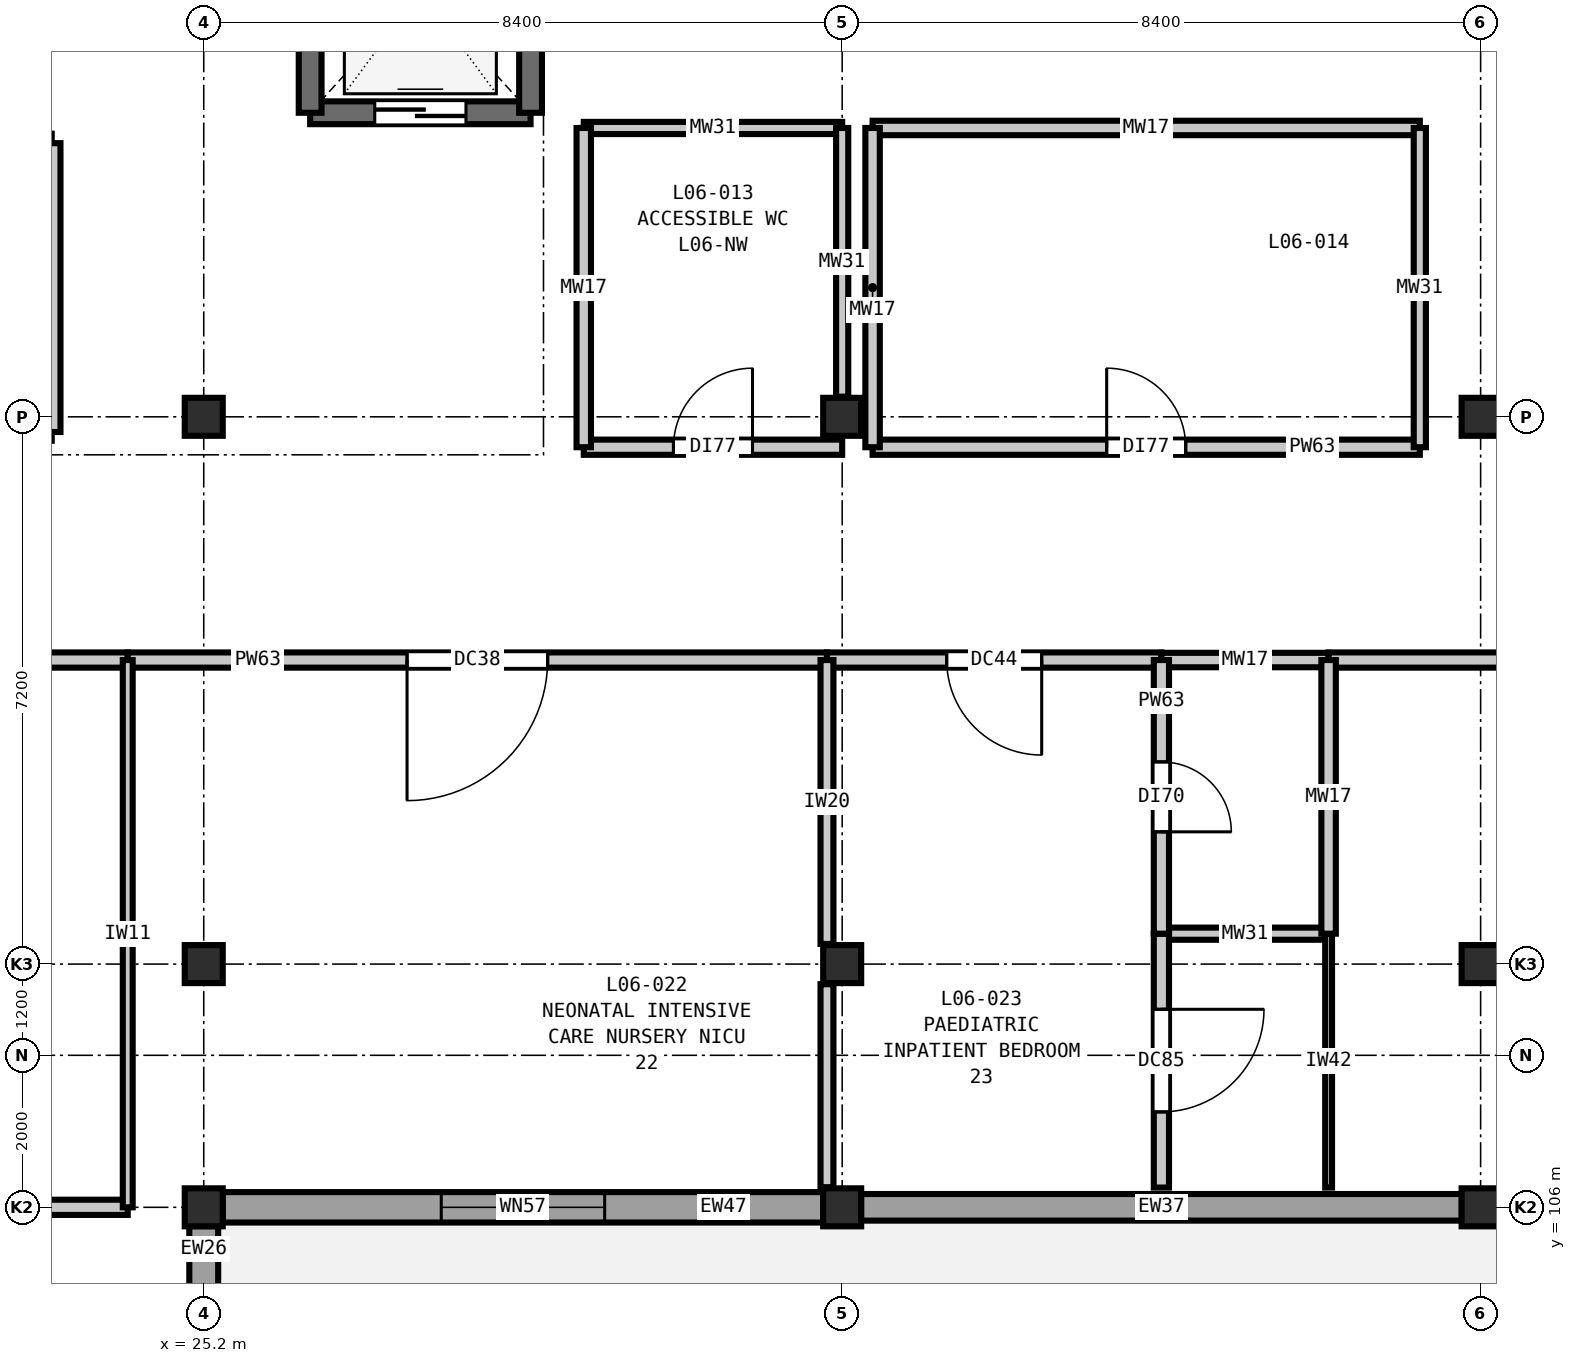
"""IFC4 building model, lengths in metres.
Left out: names, types, materials, properties, quantities, classifications, styles, units other than length and angle.
Written with IfcOpenShell. Run it as: python <this file> out.ifc"""

import sys

from ifc_helpers import new_model, si_unit, direction, frame, frame_2d, origin, origin_2d, place, context, subcontext, project, spatial, rectangle, extrude, element, fill, save


model = new_model("IFC4")
c1 = context("Model", 3, precision=1e-05, world=origin(), true_north=direction((0.0, 1.0)))
c2 = subcontext(c1, "Body", "Model", "MODEL_VIEW")
j1 = project(units=[si_unit("LENGTHUNIT", "METRE"), si_unit("PLANEANGLEUNIT", "RADIAN")], contexts=[c1])
p1 = place(None, origin())
s1 = spatial("IfcSite", under=j1, at=p1, CompositionType="ELEMENT")
p2 = place(p1, origin())
s2 = spatial("IfcBuilding", under=s1, at=p2, CompositionType="ELEMENT")
p3 = place(p2, frame((0.0, 0.0, 28.8)))
s3 = spatial("IfcBuildingStorey", under=s2, at=p3, CompositionType="ELEMENT", Elevation=28.8)
for number, where, z_axis, x_axis in (
    (1, (25.2, 106.0, 0.0), (0.0, 0.0, 1.0), (1.0, 0.0, 0.0)),
    (2, (25.2, 109.2, 0.0), (0.0, 0.0, 1.0), (1.0, 0.0, 0.0)),
    (3, (25.2, 116.4, 0.0), (0.0, 0.0, 1.0), (1.0, 0.0, 0.0)),
    (4, (33.6, 106.0, 0.0), (0.0, 0.0, 1.0), (1.0, 0.0, 0.0)),
    (5, (33.6, 109.2, 0.0), (0.0, 0.0, 1.0), (1.0, 0.0, 0.0)),
    (6, (33.6, 116.4, 0.0), (0.0, 0.0, 1.0), (1.0, 0.0, 0.0)),
    (7, (42.0, 106.0, 0.0), (0.0, 0.0, 1.0), (1.0, 0.0, 0.0)),
    (8, (42.0, 109.2, 0.0), (0.0, 0.0, 1.0), (1.0, 0.0, 0.0)),
    (9, (42.0, 116.4, 0.0), (0.0, 0.0, 1.0), (1.0, 0.0, 0.0)),
):
    element("IfcColumn", number, at=place(p3, frame(where, z_axis=z_axis, x_axis=x_axis)), inside=s3, PredefinedType="COLUMN", context=c2, shape_type="SweptSolid", body=[
        extrude(rectangle(XDim=0.5, YDim=0.5, at=origin_2d()), origin(), (0.0, 0.0, 1.0), 4.2),
    ])
p4 = place(p3, frame((41.752, 106.0, 0.0), z_axis=(0.0, 0.0, 1.0), x_axis=(-1.0, 0.0, 0.0)))
e10 = element("IfcWall", 10, at=p4, inside=s3, PredefinedType="SOLIDWALL", context=c2, shape_type="SweptSolid", body=[
    extrude(rectangle(XDim=7.904, YDim=0.35, at=frame_2d((3.952, 0.0))), origin(), (0.0, 0.0, 1.0), 3.48),
])
p5 = place(p3, frame((33.352, 106.0, 0.0), z_axis=(0.0, 0.0, 1.0), x_axis=(-1.0, 0.0, 0.0)))
e11 = element("IfcWall", 11, at=p5, inside=s3, PredefinedType="SOLIDWALL", context=c2, shape_type="SweptSolid", body=[
    extrude(rectangle(XDim=7.904, YDim=0.4, at=frame_2d((3.952, 0.0))), origin(), (0.0, 0.0, 1.0), 3.48),
])
p6 = place(p5, frame((2.877, 0.0, 0.9)))
e12 = element("IfcOpeningElement", 12, at=p6, cuts=e11, PredefinedType="OPENING", context=c2, shape_type="SweptSolid", body=[
    extrude(rectangle(XDim=2.15, YDim=2.15, at=frame_2d((1.075, 1.075))), frame((0.0, 0.21, 0.0), z_axis=(0.0, -1.0, 0.0), x_axis=(1.0, 0.0, 0.0)), (0.0, 0.0, 1.0), 0.42),
])
p7 = place(p3, frame((25.2, 105.752, 0.0), z_axis=(0.0, 0.0, 1.0), x_axis=(0.0, -1.0, 0.0)))
e13 = element("IfcWall", 13, at=p7, inside=s3, PredefinedType="SOLIDWALL", context=c2, shape_type="SweptSolid", body=[
    extrude(rectangle(XDim=2.704, YDim=0.38, at=frame_2d((1.352, 0.0))), origin(), (0.0, 0.0, 1.0), 3.48),
])
p8 = place(p7, frame((0.852, 0.0, 0.9)))
e14 = element("IfcOpeningElement", 14, at=p8, cuts=e13, PredefinedType="OPENING", context=c2, shape_type="SweptSolid", body=[
    extrude(rectangle(XDim=1.0, YDim=1.55, at=frame_2d((0.5, 0.775))), frame((0.0, 0.2, 0.0), z_axis=(0.0, -1.0, 0.0), x_axis=(1.0, 0.0, 0.0)), (0.0, 0.0, 1.0), 0.4),
])
p9 = place(p3, frame((26.6, 120.4, 0.0), z_axis=(0.0, 0.0, 1.0), x_axis=(1.0, 0.0, 0.0)))
e15 = element("IfcWall", 15, at=p9, inside=s3, PredefinedType="SHEAR", context=c2, shape_type="SweptSolid", body=[
    extrude(rectangle(XDim=2.9, YDim=0.3, at=frame_2d((1.45, 0.0))), origin(), (0.0, 0.0, 1.0), 4.2),
])
p10 = place(p9, frame((0.85, 0.0, 0.0)))
e16 = element("IfcOpeningElement", 16, at=p10, cuts=e15, PredefinedType="OPENING", context=c2, shape_type="SweptSolid", body=[
    extrude(rectangle(XDim=1.2, YDim=2.2, at=frame_2d((0.6, 1.1))), frame((0.0, 0.16, 0.0), z_axis=(0.0, -1.0, 0.0), x_axis=(1.0, 0.0, 0.0)), (0.0, 0.0, 1.0), 0.32),
])
for number, where, z_axis, x_axis in (
    (17, (29.5, 120.4, 0.0), (0.0, 0.0, 1.0), (0.0, 1.0, 0.0)),
    (18, (26.6, 123.6, 0.0), (0.0, 0.0, 1.0), (0.0, -1.0, 0.0)),
):
    element("IfcWall", number, at=place(p3, frame(where, z_axis=z_axis, x_axis=x_axis)), inside=s3, PredefinedType="SHEAR", context=c2, shape_type="SweptSolid", body=[
        extrude(rectangle(XDim=3.2, YDim=0.3, at=frame_2d((1.6, 0.0))), origin(), (0.0, 0.0, 1.0), 4.2),
    ])
p11 = place(p3, frame((17.065, 106.0, 0.0), z_axis=(0.0, 0.0, 1.0), x_axis=(1.0, 0.0, 0.0)))
e19 = element("IfcWall", 19, at=p11, inside=s3, PredefinedType="PARTITIONING", context=c2, shape_type="SweptSolid", body=[
    extrude(rectangle(XDim=7.135, YDim=0.2, at=frame_2d((3.567, 0.0))), origin(), (0.0, 0.0, 1.0), 3.635),
])
p12 = place(p11, frame((2.643, 0.0, 0.0)))
e20 = element("IfcOpeningElement", 20, at=p12, cuts=e19, PredefinedType="OPENING", context=c2, shape_type="SweptSolid", body=[
    extrude(rectangle(XDim=1.85, YDim=2.3, at=frame_2d((0.925, 1.15))), frame((0.0, 0.11, 0.0), z_axis=(0.0, -1.0, 0.0), x_axis=(1.0, 0.0, 0.0)), (0.0, 0.0, 1.0), 0.22),
])
p13 = place(p3, frame((37.8, 109.6, 0.0), z_axis=(0.0, 0.0, 1.0), x_axis=(1.0, 0.0, 0.0)))
e21 = element("IfcWall", 21, at=p13, inside=s3, PredefinedType="PLUMBINGWALL", context=c2, shape_type="SweptSolid", body=[
    extrude(rectangle(XDim=2.2, YDim=0.16, at=frame_2d((1.1, 0.0))), origin(), (0.0, 0.0, 1.0), 3.92),
])
p14 = place(p3, frame((15.8, 113.2, 0.0), z_axis=(0.0, 0.0, 1.0), x_axis=(1.0, 0.0, 0.0)))
e22 = element("IfcWall", 22, at=p14, inside=s3, PredefinedType="PARTITIONING", context=c2, shape_type="SweptSolid", body=[
    extrude(rectangle(XDim=8.4, YDim=0.2, at=frame_2d((4.2, 0.0))), origin(), (0.0, 0.0, 1.0), 3.92),
])
p15 = place(p14, frame((3.35, 0.0, 0.0)))
e23 = element("IfcOpeningElement", 23, at=p15, cuts=e22, PredefinedType="OPENING", context=c2, shape_type="SweptSolid", body=[
    extrude(rectangle(XDim=1.7, YDim=2.3, at=frame_2d((0.85, 1.15))), frame((0.0, 0.11, 0.0), z_axis=(0.0, -1.0, 0.0), x_axis=(1.0, 0.0, 0.0)), (0.0, 0.0, 1.0), 0.22),
])
p16 = place(p3, frame((24.2, 113.2, 0.0), z_axis=(0.0, 0.0, 1.0), x_axis=(1.0, 0.0, 0.0)))
e24 = element("IfcWall", 24, at=p16, inside=s3, PredefinedType="PARTITIONING", context=c2, shape_type="SweptSolid", body=[
    extrude(rectangle(XDim=9.2, YDim=0.2, at=frame_2d((4.6, 0.0))), origin(), (0.0, 0.0, 1.0), 3.92),
])
p17 = place(p16, frame((3.675, 0.0, 0.0)))
e25 = element("IfcOpeningElement", 25, at=p17, cuts=e24, PredefinedType="OPENING", context=c2, shape_type="SweptSolid", body=[
    extrude(rectangle(XDim=1.85, YDim=2.3, at=frame_2d((0.925, 1.15))), frame((0.0, 0.11, 0.0), z_axis=(0.0, -1.0, 0.0), x_axis=(1.0, 0.0, 0.0)), (0.0, 0.0, 1.0), 0.22),
])
p18 = place(p3, frame((33.4, 113.2, 0.0), z_axis=(0.0, 0.0, 1.0), x_axis=(1.0, 0.0, 0.0)))
e26 = element("IfcWall", 26, at=p18, inside=s3, PredefinedType="PARTITIONING", context=c2, shape_type="SweptSolid", body=[
    extrude(rectangle(XDim=4.4, YDim=0.2, at=frame_2d((2.2, 0.0))), origin(), (0.0, 0.0, 1.0), 3.92),
])
p19 = place(p18, frame((1.575, 0.0, 0.0)))
e27 = element("IfcOpeningElement", 27, at=p19, cuts=e26, PredefinedType="OPENING", context=c2, shape_type="SweptSolid", body=[
    extrude(rectangle(XDim=1.25, YDim=2.15, at=frame_2d((0.625, 1.075))), frame((0.0, 0.11, 0.0), z_axis=(0.0, -1.0, 0.0), x_axis=(1.0, 0.0, 0.0)), (0.0, 0.0, 1.0), 0.22),
])
p20 = place(p3, frame((37.8, 113.2, 0.0), z_axis=(0.0, 0.0, 1.0), x_axis=(1.0, 0.0, 0.0)))
e28 = element("IfcWall", 28, at=p20, inside=s3, PredefinedType="PLUMBINGWALL", context=c2, shape_type="SweptSolid", body=[
    extrude(rectangle(XDim=2.2, YDim=0.19, at=frame_2d((1.1, 0.0))), origin(), (0.0, 0.0, 1.0), 3.92),
])
p21 = place(p3, frame((40.0, 113.2, 0.0), z_axis=(0.0, 0.0, 1.0), x_axis=(1.0, 0.0, 0.0)))
e29 = element("IfcWall", 29, at=p21, inside=s3, PredefinedType="PARTITIONING", context=c2, shape_type="SweptSolid", body=[
    extrude(rectangle(XDim=8.4, YDim=0.2, at=frame_2d((4.2, 0.0))), origin(), (0.0, 0.0, 1.0), 3.92),
])
p22 = place(p21, frame((3.55, 0.0, 0.0)))
e30 = element("IfcOpeningElement", 30, at=p22, cuts=e29, PredefinedType="OPENING", context=c2, shape_type="SweptSolid", body=[
    extrude(rectangle(XDim=1.3, YDim=2.2, at=frame_2d((0.65, 1.1))), frame((0.0, 0.11, 0.0), z_axis=(0.0, -1.0, 0.0), x_axis=(1.0, 0.0, 0.0)), (0.0, 0.0, 1.0), 0.22),
])
p23 = place(p3, frame((30.2, 116.0, 0.0), z_axis=(0.0, 0.0, 1.0), x_axis=(1.0, 0.0, 0.0)))
e31 = element("IfcWall", 31, at=p23, inside=s3, PredefinedType="PARTITIONING", context=c2, shape_type="SweptSolid", body=[
    extrude(rectangle(XDim=3.4, YDim=0.2, at=frame_2d((1.7, 0.0))), origin(), (0.0, 0.0, 1.0), 3.92),
])
p24 = place(p23, frame((1.18, 0.0, 0.0)))
e32 = element("IfcOpeningElement", 32, at=p24, cuts=e31, PredefinedType="OPENING", context=c2, shape_type="SweptSolid", body=[
    extrude(rectangle(XDim=1.04, YDim=2.1, at=frame_2d((0.52, 1.05))), frame((0.0, 0.11, 0.0), z_axis=(0.0, -1.0, 0.0), x_axis=(1.0, 0.0, 0.0)), (0.0, 0.0, 1.0), 0.22),
])
p25 = place(p3, frame((34.0, 116.0, 0.0), z_axis=(0.0, 0.0, 1.0), x_axis=(1.0, 0.0, 0.0)))
e33 = element("IfcWall", 33, at=p25, inside=s3, PredefinedType="PARTITIONING", context=c2, shape_type="SweptSolid", body=[
    extrude(rectangle(XDim=7.2, YDim=0.2, at=frame_2d((3.6, 0.0))), origin(), (0.0, 0.0, 1.0), 3.92),
])
p26 = place(p25, frame((3.08, 0.0, 0.0)))
e34 = element("IfcOpeningElement", 34, at=p26, cuts=e33, PredefinedType="OPENING", context=c2, shape_type="SweptSolid", body=[
    extrude(rectangle(XDim=1.04, YDim=2.1, at=frame_2d((0.52, 1.05))), frame((0.0, 0.11, 0.0), z_axis=(0.0, -1.0, 0.0), x_axis=(1.0, 0.0, 0.0)), (0.0, 0.0, 1.0), 0.22),
])
p27 = place(p3, frame((30.2, 120.2, 0.0), z_axis=(0.0, 0.0, 1.0), x_axis=(1.0, 0.0, 0.0)))
e35 = element("IfcWall", 35, at=p27, inside=s3, PredefinedType="PLUMBINGWALL", context=c2, shape_type="SweptSolid", body=[
    extrude(rectangle(XDim=3.4, YDim=0.16, at=frame_2d((1.7, 0.0))), origin(), (0.0, 0.0, 1.0), 3.92),
])
p28 = place(p3, frame((34.0, 120.2, 0.0), z_axis=(0.0, 0.0, 1.0), x_axis=(1.0, 0.0, 0.0)))
e36 = element("IfcWall", 36, at=p28, inside=s3, PredefinedType="PLUMBINGWALL", context=c2, shape_type="SweptSolid", body=[
    extrude(rectangle(XDim=7.2, YDim=0.19, at=frame_2d((3.6, 0.0))), origin(), (0.0, 0.0, 1.0), 3.92),
])
p29 = place(p3, frame((23.2, 116.2, 0.0), z_axis=(0.0, 0.0, 1.0), x_axis=(0.0, 1.0, 0.0)))
e37 = element("IfcWall", 37, at=p29, inside=s3, PredefinedType="PARTITIONING", context=c2, shape_type="SweptSolid", body=[
    extrude(rectangle(XDim=3.8, YDim=0.23, at=frame_2d((1.9, 0.0))), origin(), (0.0, 0.0, 1.0), 3.92),
])
p30 = place(p3, frame((24.2, 106.0, 0.0), z_axis=(0.0, 0.0, 1.0), x_axis=(0.0, 1.0, 0.0)))
e38 = element("IfcWall", 38, at=p30, inside=s3, PredefinedType="PARTITIONING", context=c2, shape_type="SweptSolid", body=[
    extrude(rectangle(XDim=7.2, YDim=0.13, at=frame_2d((3.6, 0.0))), origin(), (0.0, 0.0, 1.0), 3.92),
])
p31 = place(p3, frame((30.2, 116.0, 0.0), z_axis=(0.0, 0.0, 1.0), x_axis=(0.0, 1.0, 0.0)))
e39 = element("IfcWall", 39, at=p31, inside=s3, PredefinedType="PLUMBINGWALL", context=c2, shape_type="SweptSolid", body=[
    extrude(rectangle(XDim=4.2, YDim=0.19, at=frame_2d((2.1, 0.0))), origin(), (0.0, 0.0, 1.0), 3.92),
])
p32 = place(p3, frame((33.4, 109.465, 0.0), z_axis=(0.0, 0.0, 1.0), x_axis=(0.0, 1.0, 0.0)))
e40 = element("IfcWall", 40, at=p32, inside=s3, PredefinedType="PARTITIONING", context=c2, shape_type="SweptSolid", body=[
    extrude(rectangle(XDim=3.735, YDim=0.17, at=frame_2d((1.867, 0.0))), origin(), (0.0, 0.0, 1.0), 3.635),
])
p33 = place(p3, frame((33.4, 106.265, 0.0), z_axis=(0.0, 0.0, 1.0), x_axis=(0.0, 1.0, 0.0)))
e41 = element("IfcWall", 41, at=p33, inside=s3, PredefinedType="PARTITIONING", context=c2, shape_type="SweptSolid", body=[
    extrude(rectangle(XDim=2.67, YDim=0.17, at=frame_2d((1.335, 0.0))), origin(), (0.0, 0.0, 1.0), 3.635),
])
p34 = place(p3, frame((33.6, 116.665, 0.0), z_axis=(0.0, 0.0, 1.0), x_axis=(0.0, 1.0, 0.0)))
e42 = element("IfcWall", 42, at=p34, inside=s3, PredefinedType="PLUMBINGWALL", context=c2, shape_type="SweptSolid", body=[
    extrude(rectangle(XDim=3.535, YDim=0.16, at=frame_2d((1.768, 0.0))), origin(), (0.0, 0.0, 1.0), 3.635),
])
p35 = place(p3, frame((34.0, 116.0, 0.0), z_axis=(0.0, 0.0, 1.0), x_axis=(0.0, 1.0, 0.0)))
e43 = element("IfcWall", 43, at=p35, inside=s3, PredefinedType="PLUMBINGWALL", context=c2, shape_type="SweptSolid", body=[
    extrude(rectangle(XDim=4.2, YDim=0.19, at=frame_2d((2.1, 0.0))), origin(), (0.0, 0.0, 1.0), 3.92),
])
p36 = place(p3, frame((37.8, 106.26, 0.0), z_axis=(0.0, 0.0, 1.0), x_axis=(0.0, 1.0, 0.0)))
e44 = element("IfcWall", 44, at=p36, inside=s3, PredefinedType="PARTITIONING", context=c2, shape_type="SweptSolid", body=[
    extrude(rectangle(XDim=3.34, YDim=0.2, at=frame_2d((1.67, 0.0))), origin(), (0.0, 0.0, 1.0), 3.92),
])
p37 = place(p36, frame((0.995, 0.0, 0.0)))
e45 = element("IfcOpeningElement", 45, at=p37, cuts=e44, PredefinedType="OPENING", context=c2, shape_type="SweptSolid", body=[
    extrude(rectangle(XDim=1.35, YDim=2.2, at=frame_2d((0.675, 1.1))), frame((0.0, 0.11, 0.0), z_axis=(0.0, -1.0, 0.0), x_axis=(1.0, 0.0, 0.0)), (0.0, 0.0, 1.0), 0.22),
])
p38 = place(p3, frame((37.8, 109.6, 0.0), z_axis=(0.0, 0.0, 1.0), x_axis=(0.0, 1.0, 0.0)))
e46 = element("IfcWall", 46, at=p38, inside=s3, PredefinedType="PARTITIONING", context=c2, shape_type="SweptSolid", body=[
    extrude(rectangle(XDim=3.6, YDim=0.2, at=frame_2d((1.8, 0.0))), origin(), (0.0, 0.0, 1.0), 3.92),
])
p39 = place(p38, frame((1.34, 0.0, 0.0)))
e47 = element("IfcOpeningElement", 47, at=p39, cuts=e46, PredefinedType="OPENING", context=c2, shape_type="SweptSolid", body=[
    extrude(rectangle(XDim=0.92, YDim=2.1, at=frame_2d((0.46, 1.05))), frame((0.0, 0.11, 0.0), z_axis=(0.0, -1.0, 0.0), x_axis=(1.0, 0.0, 0.0)), (0.0, 0.0, 1.0), 0.22),
])
p40 = place(p3, frame((40.0, 106.26, 0.0), z_axis=(0.0, 0.0, 1.0), x_axis=(0.0, 1.0, 0.0)))
e48 = element("IfcWall", 48, at=p40, inside=s3, PredefinedType="PARTITIONING", context=c2, shape_type="SweptSolid", body=[
    extrude(rectangle(XDim=3.34, YDim=0.09, at=frame_2d((1.67, 0.0))), origin(), (0.0, 0.0, 1.0), 3.92),
])
p41 = place(p3, frame((40.0, 109.6, 0.0), z_axis=(0.0, 0.0, 1.0), x_axis=(0.0, 1.0, 0.0)))
e49 = element("IfcWall", 49, at=p41, inside=s3, PredefinedType="PLUMBINGWALL", context=c2, shape_type="SweptSolid", body=[
    extrude(rectangle(XDim=3.6, YDim=0.19, at=frame_2d((1.8, 0.0))), origin(), (0.0, 0.0, 1.0), 3.92),
])
p42 = place(p3, frame((41.2, 116.0, 0.0), z_axis=(0.0, 0.0, 1.0), x_axis=(0.0, 1.0, 0.0)))
e50 = element("IfcWall", 50, at=p42, inside=s3, PredefinedType="PLUMBINGWALL", context=c2, shape_type="SweptSolid", body=[
    extrude(rectangle(XDim=4.2, YDim=0.16, at=frame_2d((2.1, 0.0))), origin(), (0.0, 0.0, 1.0), 3.92),
])
p43 = place(p6, origin())
e51 = element("IfcWindow", 51, at=p43, inside=s3, PartitioningType="DOUBLE_PANEL_VERTICAL", PredefinedType="WINDOW", context=c2, shape_type="SweptSolid", body=[
    extrude(rectangle(XDim=2.15, YDim=2.15, at=frame_2d((1.075, 1.075))), frame((0.0, 0.03, 0.0), z_axis=(0.0, -1.0, 0.0), x_axis=(1.0, 0.0, 0.0)), (0.0, 0.0, 1.0), 0.06),
])
fill(e12, e51)
p44 = place(p10, origin())
e52 = element("IfcDoor", 52, at=p44, inside=s3, OperationType="DOUBLE_DOOR_SLIDING", PredefinedType="DOOR", context=c2, shape_type="SweptSolid", body=[
    extrude(rectangle(XDim=1.2, YDim=2.2, at=frame_2d((0.6, 1.1))), frame((0.0, 0.025, 0.0), z_axis=(0.0, -1.0, 0.0), x_axis=(1.0, 0.0, 0.0)), (0.0, 0.0, 1.0), 0.05),
])
fill(e16, e52)
p45 = place(p17, frame((1.85, 0.0, 0.0), z_axis=(0.0, 0.0, 1.0), x_axis=(-1.0, 0.0, 0.0)))
e53 = element("IfcDoor", 53, at=p45, inside=s3, OperationType="SINGLE_SWING_RIGHT", PredefinedType="DOOR", context=c2, shape_type="SweptSolid", body=[
    extrude(rectangle(XDim=1.85, YDim=2.3, at=frame_2d((0.925, 1.15))), frame((0.0, 0.025, 0.0), z_axis=(0.0, -1.0, 0.0), x_axis=(1.0, 0.0, 0.0)), (0.0, 0.0, 1.0), 0.05),
])
fill(e25, e53)
p46 = place(p19, frame((1.25, 0.0, 0.0), z_axis=(0.0, 0.0, 1.0), x_axis=(-1.0, 0.0, 0.0)))
e54 = element("IfcDoor", 54, at=p46, inside=s3, OperationType="SINGLE_SWING_LEFT", PredefinedType="DOOR", context=c2, shape_type="SweptSolid", body=[
    extrude(rectangle(XDim=1.25, YDim=2.15, at=frame_2d((0.625, 1.075))), frame((0.0, 0.025, 0.0), z_axis=(0.0, -1.0, 0.0), x_axis=(1.0, 0.0, 0.0)), (0.0, 0.0, 1.0), 0.05),
])
fill(e27, e54)
p47 = place(p24, origin())
e55 = element("IfcDoor", 55, at=p47, inside=s3, OperationType="SINGLE_SWING_RIGHT", PredefinedType="DOOR", context=c2, shape_type="SweptSolid", body=[
    extrude(rectangle(XDim=1.04, YDim=2.1, at=frame_2d((0.52, 1.05))), frame((0.0, 0.025, 0.0), z_axis=(0.0, -1.0, 0.0), x_axis=(1.0, 0.0, 0.0)), (0.0, 0.0, 1.0), 0.05),
])
fill(e32, e55)
p48 = place(p26, origin())
e56 = element("IfcDoor", 56, at=p48, inside=s3, OperationType="SINGLE_SWING_LEFT", PredefinedType="DOOR", context=c2, shape_type="SweptSolid", body=[
    extrude(rectangle(XDim=1.04, YDim=2.1, at=frame_2d((0.52, 1.05))), frame((0.0, 0.025, 0.0), z_axis=(0.0, -1.0, 0.0), x_axis=(1.0, 0.0, 0.0)), (0.0, 0.0, 1.0), 0.05),
])
fill(e34, e56)
p49 = place(p37, frame((1.35, 0.0, 0.0), z_axis=(0.0, 0.0, 1.0), x_axis=(-1.0, 0.0, 0.0)))
e57 = element("IfcDoor", 57, at=p49, inside=s3, OperationType="SINGLE_SWING_LEFT", PredefinedType="DOOR", context=c2, shape_type="SweptSolid", body=[
    extrude(rectangle(XDim=1.35, YDim=2.2, at=frame_2d((0.675, 1.1))), frame((0.0, 0.025, 0.0), z_axis=(0.0, -1.0, 0.0), x_axis=(1.0, 0.0, 0.0)), (0.0, 0.0, 1.0), 0.05),
])
fill(e45, e57)
p50 = place(p39, frame((0.92, 0.0, 0.0), z_axis=(0.0, 0.0, 1.0), x_axis=(-1.0, 0.0, 0.0)))
e58 = element("IfcDoor", 58, at=p50, inside=s3, OperationType="SINGLE_SWING_RIGHT", PredefinedType="DOOR", context=c2, shape_type="SweptSolid", body=[
    extrude(rectangle(XDim=0.92, YDim=2.1, at=frame_2d((0.46, 1.05))), frame((0.0, 0.025, 0.0), z_axis=(0.0, -1.0, 0.0), x_axis=(1.0, 0.0, 0.0)), (0.0, 0.0, 1.0), 0.05),
])
fill(e47, e58)
save(model, sys.argv[1])
